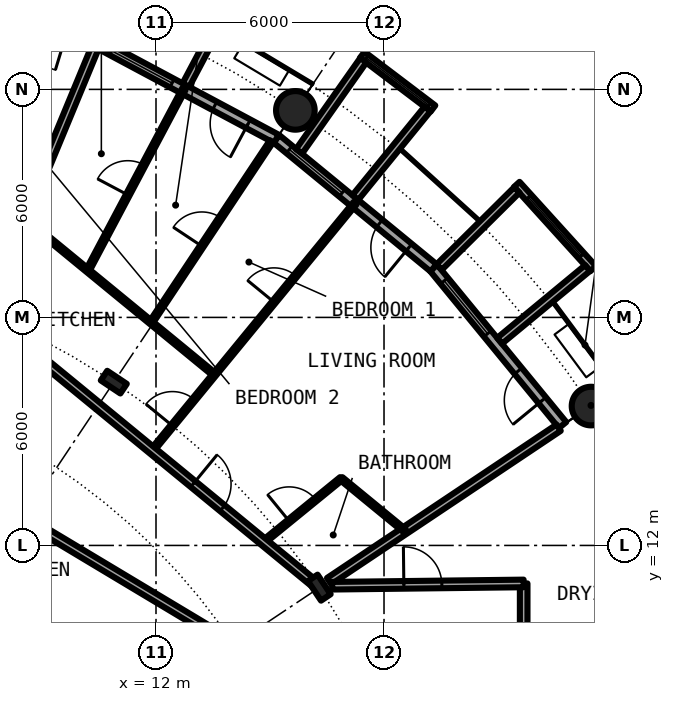
"""IFC4 building model, lengths in metres.
Left out: names, types, materials, properties, quantities, classifications, styles, units other than length and angle.
Written with IfcOpenShell. Run it as: python <this file> out.ifc"""

import sys

from ifc_helpers import new_model, si_unit, direction, frame, frame_2d, origin, origin_2d, place, context, subcontext, project, spatial, rectangle, circle, hollow_circle, i_section, extrude, element, fill, save


model = new_model("IFC4")
c1 = context("Model", 3, precision=1e-05, world=origin(), true_north=direction((0.0, 1.0)))
c2 = subcontext(c1, "Body", "Model", "MODEL_VIEW")
j1 = project(units=[si_unit("LENGTHUNIT", "METRE"), si_unit("PLANEANGLEUNIT", "RADIAN")], contexts=[c1])
p1 = place(None, origin())
s1 = spatial("IfcSite", under=j1, at=p1, CompositionType="ELEMENT")
p2 = place(p1, origin())
s2 = spatial("IfcBuilding", under=s1, at=p2, CompositionType="ELEMENT")
p3 = place(p2, frame((0.0, 0.0, 50.25)))
s3 = spatial("IfcBuildingStorey", under=s2, at=p3, CompositionType="ELEMENT", Elevation=50.25)
for number, where, z_axis, x_axis in (
    (1, (23.448, 15.667, 0.0), (0.0, 0.0, 1.0), (1.0, 0.0, 0.0)),
    (2, (15.667, 23.448, 0.0), (0.0, 0.0, 1.0), (1.0, 0.0, 0.0)),
):
    element("IfcColumn", number, at=place(p3, frame(where, z_axis=z_axis, x_axis=x_axis)), inside=s3, PredefinedType="COLUMN", context=c2, shape_type="SweptSolid", body=[
        extrude(hollow_circle(Radius=0.508, WallThickness=0.05, at=origin_2d()), origin(), (0.0, 0.0, 1.0), 3.05),
    ])
for number, where, z_axis, x_axis in (
    (3, (16.297, 10.889, 0.0), (0.0, 0.0, 1.0), (0.831, 0.556, 0.0)),
    (4, (10.889, 16.297, 0.0), (0.0, 0.0, 1.0), (0.556, 0.831, 0.0)),
):
    element("IfcColumn", number, at=place(p3, frame(where, z_axis=z_axis, x_axis=x_axis)), inside=s3, PredefinedType="COLUMN", context=c2, shape_type="SweptSolid", body=[
        extrude(i_section(OverallWidth=0.305, OverallDepth=0.62, WebThickness=0.021, FlangeThickness=0.04, FilletRadius=0.027, at=origin_2d()), origin(), (0.0, 0.0, 1.0), 3.05),
    ])
p4 = place(p3, frame((22.699, 15.167, 0.0), z_axis=(0.0, 0.0, 1.0), x_axis=(-0.634382322723, 0.773019449054, 0.0)))
e5 = element("IfcWall", 5, at=p4, inside=s3, PredefinedType="SOLIDWALL", context=c2, shape_type="SweptSolid", body=[
    extrude(rectangle(XDim=5.352, YDim=0.25, at=frame_2d((2.676, 0.0))), origin(), (0.0, 0.0, 1.0), 2.7),
])
p5 = place(p4, frame((0.841, 0.0, 0.0)))
e6 = element("IfcOpeningElement", 6, at=p5, cuts=e5, PredefinedType="OPENING", context=c2, shape_type="SweptSolid", body=[
    extrude(rectangle(XDim=1.0, YDim=2.2, at=frame_2d((0.5, 1.1))), frame((0.0, 0.135, 0.0), z_axis=(0.0, -1.0, 0.0), x_axis=(1.0, 0.0, 0.0)), (0.0, 0.0, 1.0), 0.27),
])
p6 = place(p4, frame((3.111, 0.0, 0.3)))
e7 = element("IfcOpeningElement", 7, at=p6, cuts=e5, PredefinedType="OPENING", context=c2, shape_type="SweptSolid", body=[
    extrude(rectangle(XDim=1.8, YDim=2.1, at=frame_2d((0.9, 1.05))), frame((0.0, 0.135, 0.0), z_axis=(0.0, -1.0, 0.0), x_axis=(1.0, 0.0, 0.0)), (0.0, 0.0, 1.0), 0.27),
])
p7 = place(p3, frame((23.503, 19.282, -0.03), z_axis=(0.0, 0.0, 1.0), x_axis=(-0.671506829416, 0.740998365753, 0.0)))
e8 = element("IfcWall", 8, at=p7, inside=s3, PredefinedType="SOLIDWALL", context=c2, shape_type="SweptSolid", body=[
    extrude(rectangle(XDim=2.993, YDim=0.2, at=frame_2d((1.497, 0.0))), origin(), (0.0, 0.0, 1.0), 2.73),
])
p8 = place(p7, frame((0.457, 0.0, 0.33)))
e9 = element("IfcOpeningElement", 9, at=p8, cuts=e8, PredefinedType="OPENING", context=c2, shape_type="SweptSolid", body=[
    extrude(circle(Radius=1.04, at=frame_2d((1.04, 1.04))), frame((0.0, 0.11, 0.0), z_axis=(0.0, -1.0, 0.0), x_axis=(1.0, 0.0, 0.0)), (0.0, 0.0, 1.0), 0.22),
])
p9 = place(p3, frame((21.041, 17.384, -0.03), z_axis=(0.0, 0.0, 1.0), x_axis=(0.770784861449, 0.63709551667, 0.0)))
e10 = element("IfcWall", 10, at=p9, inside=s3, PredefinedType="SOLIDWALL", context=c2, shape_type="SweptSolid", body=[
    extrude(rectangle(XDim=3.006, YDim=0.2, at=frame_2d((1.503, 0.0))), origin(), (0.0, 0.0, 1.0), 2.73),
])
p10 = place(p3, frame((19.45, 19.323, -0.03), z_axis=(0.0, 0.0, 1.0), x_axis=(0.709727076896, 0.704476739375, 0.0)))
e11 = element("IfcWall", 11, at=p10, inside=s3, PredefinedType="SOLIDWALL", context=c2, shape_type="SweptSolid", body=[
    extrude(rectangle(XDim=2.883, YDim=0.2, at=frame_2d((1.441, 0.0))), origin(), (0.0, 0.0, 1.0), 2.73),
])
p11 = place(p3, frame((19.304, 19.304, 0.0), z_axis=(0.0, 0.0, 1.0), x_axis=(-0.773019449054, 0.634382322723, 0.0)))
e12 = element("IfcWall", 12, at=p11, inside=s3, PredefinedType="SOLIDWALL", context=c2, shape_type="SweptSolid", body=[
    extrude(rectangle(XDim=5.352, YDim=0.25, at=frame_2d((2.676, 0.0))), origin(), (0.0, 0.0, 1.0), 2.7),
])
p12 = place(p11, frame((0.841, 0.0, 0.0)))
e13 = element("IfcOpeningElement", 13, at=p12, cuts=e12, PredefinedType="OPENING", context=c2, shape_type="SweptSolid", body=[
    extrude(rectangle(XDim=1.0, YDim=2.2, at=frame_2d((0.5, 1.1))), frame((0.0, 0.135, 0.0), z_axis=(0.0, -1.0, 0.0), x_axis=(1.0, 0.0, 0.0)), (0.0, 0.0, 1.0), 0.27),
])
p13 = place(p11, frame((3.111, 0.0, 0.3)))
e14 = element("IfcOpeningElement", 14, at=p13, cuts=e12, PredefinedType="OPENING", context=c2, shape_type="SweptSolid", body=[
    extrude(rectangle(XDim=1.8, YDim=2.1, at=frame_2d((0.9, 1.05))), frame((0.0, 0.135, 0.0), z_axis=(0.0, -1.0, 0.0), x_axis=(1.0, 0.0, 0.0)), (0.0, 0.0, 1.0), 0.27),
])
p14 = place(p3, frame((19.289, 23.497, -0.03), z_axis=(0.0, 0.0, 1.0), x_axis=(-0.796842165306, 0.60418752353, 0.0)))
e15 = element("IfcWall", 15, at=p14, inside=s3, PredefinedType="SOLIDWALL", context=c2, shape_type="SweptSolid", body=[
    extrude(rectangle(XDim=2.337, YDim=0.2, at=frame_2d((1.168, 0.0))), origin(), (0.0, 0.0, 1.0), 2.73),
])
p15 = place(p14, frame((0.128, 0.0, 0.33)))
e16 = element("IfcOpeningElement", 16, at=p15, cuts=e15, PredefinedType="OPENING", context=c2, shape_type="SweptSolid", body=[
    extrude(circle(Radius=1.04, at=frame_2d((1.04, 1.04))), frame((0.0, 0.11, 0.0), z_axis=(0.0, -1.0, 0.0), x_axis=(1.0, 0.0, 0.0)), (0.0, 0.0, 1.0), 0.22),
])
p16 = place(p3, frame((17.246, 21.155, -0.03), z_axis=(0.0, 0.0, 1.0), x_axis=(0.631741648902, 0.775179004516, 0.0)))
e17 = element("IfcWall", 17, at=p16, inside=s3, PredefinedType="SOLIDWALL", context=c2, shape_type="SweptSolid", body=[
    extrude(rectangle(XDim=3.006, YDim=0.2, at=frame_2d((1.503, 0.0))), origin(), (0.0, 0.0, 1.0), 2.73),
])
p17 = place(p3, frame((15.765, 22.37, -0.03), z_axis=(0.0, 0.0, 1.0), x_axis=(0.576274612209, 0.817256123454, 0.0)))
e18 = element("IfcWall", 18, at=p17, inside=s3, PredefinedType="SOLIDWALL", context=c2, shape_type="SweptSolid", body=[
    extrude(rectangle(XDim=2.933, YDim=0.2, at=frame_2d((1.466, 0.0))), origin(), (0.0, 0.0, 1.0), 2.73),
])
p18 = place(p3, frame((15.167, 22.699, 0.0), z_axis=(0.0, 0.0, 1.0), x_axis=(-0.881915646801, 0.471407246368, 0.0)))
e19 = element("IfcWall", 19, at=p18, inside=s3, PredefinedType="SOLIDWALL", context=c2, shape_type="SweptSolid", body=[
    extrude(rectangle(XDim=5.352, YDim=0.25, at=frame_2d((2.676, 0.0))), origin(), (0.0, 0.0, 1.0), 2.7),
])
p19 = place(p18, frame((0.841, 0.0, 0.0)))
e20 = element("IfcOpeningElement", 20, at=p19, cuts=e19, PredefinedType="OPENING", context=c2, shape_type="SweptSolid", body=[
    extrude(rectangle(XDim=1.0, YDim=2.2, at=frame_2d((0.5, 1.1))), frame((0.0, 0.135, 0.0), z_axis=(0.0, -1.0, 0.0), x_axis=(1.0, 0.0, 0.0)), (0.0, 0.0, 1.0), 0.27),
])
p20 = place(p18, frame((3.111, 0.0, 0.3)))
e21 = element("IfcOpeningElement", 21, at=p20, cuts=e19, PredefinedType="OPENING", context=c2, shape_type="SweptSolid", body=[
    extrude(rectangle(XDim=1.8, YDim=2.1, at=frame_2d((0.9, 1.05))), frame((0.0, 0.135, 0.0), z_axis=(0.0, -1.0, 0.0), x_axis=(1.0, 0.0, 0.0)), (0.0, 0.0, 1.0), 0.27),
])
p21 = place(p3, frame((12.787, 24.113, -0.03), z_axis=(0.0, 0.0, 1.0), x_axis=(0.468365282436, 0.883534924159, 0.0)))
e22 = element("IfcWall", 22, at=p21, inside=s3, PredefinedType="SOLIDWALL", context=c2, shape_type="SweptSolid", body=[
    extrude(rectangle(XDim=3.006, YDim=0.2, at=frame_2d((1.503, 0.0))), origin(), (0.0, 0.0, 1.0), 2.73),
])
p22 = place(p3, frame((21.675, 9.4, 0.0), z_axis=(0.0, 0.0, 1.0), x_axis=(0.0, 1.0, 0.0)))
e23 = element("IfcWall", 23, at=p22, inside=s3, PredefinedType="PARTITIONING", context=c2, shape_type="SweptSolid", body=[
    extrude(rectangle(XDim=1.6, YDim=0.2, at=frame_2d((0.8, 0.0))), origin(), (0.0, 0.0, 1.0), 2.7),
])
p23 = place(p3, frame((7.501, 18.108, 0.0), z_axis=(0.0, 0.0, 1.0), x_axis=(0.382600411313, 0.923913916587, 0.0)))
e24 = element("IfcWall", 24, at=p23, inside=s3, PredefinedType="PARTITIONING", context=c2, shape_type="SweptSolid", body=[
    extrude(rectangle(XDim=7.574, YDim=0.2, at=frame_2d((3.787, 0.0))), origin(), (0.0, 0.0, 1.0), 2.7),
])
p24 = place(p3, frame((10.202, 19.234, 0.0), z_axis=(0.0, 0.0, 1.0), x_axis=(0.468610030042, 0.883405139075, 0.0)))
e25 = element("IfcWall", 25, at=p24, inside=s3, PredefinedType="PARTITIONING", context=c2, shape_type="SweptSolid", body=[
    extrude(rectangle(XDim=5.403, YDim=0.1, at=frame_2d((2.702, 0.0))), origin(), (0.0, 0.0, 1.0), 2.7),
])
p25 = place(p24, frame((2.252, 0.0, 0.0)))
e26 = element("IfcOpeningElement", 26, at=p25, cuts=e25, PredefinedType="OPENING", context=c2, shape_type="SweptSolid", body=[
    extrude(rectangle(XDim=0.9, YDim=2.3, at=frame_2d((0.45, 1.15))), frame((0.0, 0.06, 0.0), z_axis=(0.0, -1.0, 0.0), x_axis=(1.0, 0.0, 0.0)), (0.0, 0.0, 1.0), 0.12),
])
p26 = place(p3, frame((11.87, 17.865, 0.0), z_axis=(0.0, 0.0, 1.0), x_axis=(0.553440102418, 0.832888980018, 0.0)))
e27 = element("IfcWall", 27, at=p26, inside=s3, PredefinedType="PARTITIONING", context=c2, shape_type="SweptSolid", body=[
    extrude(rectangle(XDim=5.726, YDim=0.1, at=frame_2d((2.863, 0.0))), origin(), (0.0, 0.0, 1.0), 2.7),
])
p27 = place(p26, frame((2.413, 0.0, 0.0)))
e28 = element("IfcOpeningElement", 28, at=p27, cuts=e27, PredefinedType="OPENING", context=c2, shape_type="SweptSolid", body=[
    extrude(rectangle(XDim=0.9, YDim=2.3, at=frame_2d((0.45, 1.15))), frame((0.0, 0.06, 0.0), z_axis=(0.0, -1.0, 0.0), x_axis=(1.0, 0.0, 0.0)), (0.0, 0.0, 1.0), 0.12),
])
p28 = place(p3, frame((11.899, 14.499, 0.0), z_axis=(0.0, 0.0, 1.0), x_axis=(0.634396151441, 0.77300810024, 0.0)))
e29 = element("IfcWall", 29, at=p28, inside=s3, PredefinedType="PARTITIONING", context=c2, shape_type="SweptSolid", body=[
    extrude(rectangle(XDim=8.419, YDim=0.1, at=frame_2d((4.209, 0.0))), origin(), (0.0, 0.0, 1.0), 2.7),
])
p29 = place(p28, frame((0.84, 0.0, 0.0)))
e30 = element("IfcOpeningElement", 30, at=p29, cuts=e29, PredefinedType="OPENING", context=c2, shape_type="SweptSolid", body=[
    extrude(rectangle(XDim=0.9, YDim=2.3, at=frame_2d((0.45, 1.15))), frame((0.0, 0.06, 0.0), z_axis=(0.0, -1.0, 0.0), x_axis=(1.0, 0.0, 0.0)), (0.0, 0.0, 1.0), 0.12),
])
p30 = place(p28, frame((5.051, 0.0, 0.0)))
e31 = element("IfcOpeningElement", 31, at=p30, cuts=e29, PredefinedType="OPENING", context=c2, shape_type="SweptSolid", body=[
    extrude(rectangle(XDim=0.9, YDim=2.3, at=frame_2d((0.45, 1.15))), frame((0.0, 0.06, 0.0), z_axis=(0.0, -1.0, 0.0), x_axis=(1.0, 0.0, 0.0)), (0.0, 0.0, 1.0), 0.12),
])
p31 = place(p3, frame((14.831, 12.092, 0.0), z_axis=(0.0, 0.0, 1.0), x_axis=(0.774979608522, 0.631986239072, 0.0)))
e32 = element("IfcWall", 32, at=p31, inside=s3, PredefinedType="PARTITIONING", context=c2, shape_type="SweptSolid", body=[
    extrude(rectangle(XDim=2.636, YDim=0.1, at=frame_2d((1.318, 0.0))), origin(), (0.0, 0.0, 1.0), 2.7),
])
p32 = place(p31, frame((0.868, 0.0, 0.0)))
e33 = element("IfcOpeningElement", 33, at=p32, cuts=e32, PredefinedType="OPENING", context=c2, shape_type="SweptSolid", body=[
    extrude(rectangle(XDim=0.9, YDim=2.3, at=frame_2d((0.45, 1.15))), frame((0.0, 0.06, 0.0), z_axis=(0.0, -1.0, 0.0), x_axis=(1.0, 0.0, 0.0)), (0.0, 0.0, 1.0), 0.12),
])
p33 = place(p3, frame((16.555, 11.061, 0.0), z_axis=(0.0, 0.0, 1.0), x_axis=(0.831403467378, 0.55566921314, 0.0)))
e34 = element("IfcWall", 34, at=p33, inside=s3, PredefinedType="PARTITIONING", context=c2, shape_type="SweptSolid", body=[
    extrude(rectangle(XDim=7.265, YDim=0.2, at=frame_2d((3.632, 0.0))), origin(), (0.0, 0.0, 1.0), 2.7),
])
p34 = place(p3, frame((16.636, 10.94, 0.0), z_axis=(0.0, 0.0, 1.0), x_axis=(0.999928980998, 0.011917758204, 0.0)))
e35 = element("IfcWall", 35, at=p34, inside=s3, PredefinedType="PARTITIONING", context=c2, shape_type="SweptSolid", body=[
    extrude(rectangle(XDim=5.039, YDim=0.2, at=frame_2d((2.52, 0.0))), origin(), (0.0, 0.0, 1.0), 2.7),
])
p35 = place(p34, frame((1.886, 0.0, 0.0)))
e36 = element("IfcOpeningElement", 36, at=p35, cuts=e35, PredefinedType="OPENING", context=c2, shape_type="SweptSolid", body=[
    extrude(rectangle(XDim=1.0, YDim=2.3, at=frame_2d((0.5, 1.15))), frame((0.0, 0.11, 0.0), z_axis=(0.0, -1.0, 0.0), x_axis=(1.0, 0.0, 0.0)), (0.0, 0.0, 1.0), 0.22),
])
p36 = place(p3, frame((4.863, 12.05, 0.0), z_axis=(0.0, 0.0, 1.0), x_axis=(0.857576410704, -0.51435658818, 0.0)))
e37 = element("IfcWall", 37, at=p36, inside=s3, PredefinedType="PARTITIONING", context=c2, shape_type="SweptSolid", body=[
    extrude(rectangle(XDim=5.16, YDim=0.1, at=frame_2d((2.58, 0.0))), origin(), (0.0, 0.0, 1.0), 2.7),
])
p37 = place(p3, frame((1.658, 16.819, 0.0), z_axis=(0.0, 0.0, 1.0), x_axis=(0.857688434449, -0.514169767113, 0.0)))
e38 = element("IfcWall", 38, at=p37, inside=s3, PredefinedType="PARTITIONING", context=c2, shape_type="SweptSolid", body=[
    extrude(rectangle(XDim=14.429, YDim=0.2, at=frame_2d((7.215, 0.0))), origin(), (0.0, 0.0, 1.0), 2.7),
])
p38 = place(p37, frame((4.316, 0.0, 0.0)))
e39 = element("IfcOpeningElement", 39, at=p38, cuts=e38, PredefinedType="OPENING", context=c2, shape_type="SweptSolid", body=[
    extrude(rectangle(XDim=1.0, YDim=2.3, at=frame_2d((0.5, 1.15))), frame((0.0, 0.11, 0.0), z_axis=(0.0, -1.0, 0.0), x_axis=(1.0, 0.0, 0.0)), (0.0, 0.0, 1.0), 0.22),
])
p39 = place(p3, frame((7.5, 18.108, 0.0), z_axis=(0.0, 0.0, 1.0), x_axis=(0.773041360816, -0.634355621452, 0.0)))
e40 = element("IfcWall", 40, at=p39, inside=s3, PredefinedType="PARTITIONING", context=c2, shape_type="SweptSolid", body=[
    extrude(rectangle(XDim=11.221, YDim=0.2, at=frame_2d((5.61, 0.0))), origin(), (0.0, 0.0, 1.0), 2.38),
])
p40 = place(p39, frame((7.083, 0.0, 0.0)))
e41 = element("IfcOpeningElement", 41, at=p40, cuts=e40, PredefinedType="OPENING", context=c2, shape_type="SweptSolid", body=[
    extrude(rectangle(XDim=1.0, YDim=2.3, at=frame_2d((0.5, 1.15))), frame((0.0, 0.11, 0.0), z_axis=(0.0, -1.0, 0.0), x_axis=(1.0, 0.0, 0.0)), (0.0, 0.0, 1.0), 0.22),
])
p41 = place(p3, frame((8.534, 20.603, 0.0), z_axis=(0.0, 0.0, 1.0), x_axis=(0.773000340237, -0.634405606843, 0.0)))
e42 = element("IfcWall", 42, at=p41, inside=s3, PredefinedType="PARTITIONING", context=c2, shape_type="SweptSolid", body=[
    extrude(rectangle(XDim=6.474, YDim=0.1, at=frame_2d((3.237, 0.0))), origin(), (0.0, 0.0, 1.0), 2.7),
])
p42 = place(p3, frame((16.874, 13.758, 0.0), z_axis=(0.0, 0.0, 1.0), x_axis=(0.772948171844, -0.634469166818, 0.0)))
e43 = element("IfcWall", 43, at=p42, inside=s3, PredefinedType="PARTITIONING", context=c2, shape_type="SweptSolid", body=[
    extrude(rectangle(XDim=2.158, YDim=0.1, at=frame_2d((1.079, 0.0))), origin(), (0.0, 0.0, 1.0), 2.7),
])
p43 = place(p5, origin())
e44 = element("IfcDoor", 44, at=p43, inside=s3, OperationType="SINGLE_SWING_LEFT", PredefinedType="DOOR", context=c2, shape_type="SweptSolid", body=[
    extrude(rectangle(XDim=1.0, YDim=2.2, at=frame_2d((0.5, 1.1))), frame((0.0, 0.025, 0.0), z_axis=(0.0, -1.0, 0.0), x_axis=(1.0, 0.0, 0.0)), (0.0, 0.0, 1.0), 0.05),
])
fill(e6, e44)
p44 = place(p6, origin())
e45 = element("IfcWindow", 45, at=p44, inside=s3, PartitioningType="SINGLE_PANEL", PredefinedType="WINDOW", context=c2, shape_type="SweptSolid", body=[
    extrude(rectangle(XDim=1.8, YDim=2.1, at=frame_2d((0.9, 1.05))), frame((0.0, 0.03, 0.0), z_axis=(0.0, -1.0, 0.0), x_axis=(1.0, 0.0, 0.0)), (0.0, 0.0, 1.0), 0.06),
])
fill(e7, e45)
p45 = place(p8, origin())
e46 = element("IfcWindow", 46, at=p45, inside=s3, PartitioningType="SINGLE_PANEL", PredefinedType="WINDOW", context=c2, shape_type="SweptSolid", body=[
    extrude(circle(Radius=1.04, at=frame_2d((1.04, 1.04))), frame((0.0, 0.03, 0.0), z_axis=(0.0, -1.0, 0.0), x_axis=(1.0, 0.0, 0.0)), (0.0, 0.0, 1.0), 0.06),
])
fill(e9, e46)
p46 = place(p12, origin())
e47 = element("IfcDoor", 47, at=p46, inside=s3, OperationType="SINGLE_SWING_LEFT", PredefinedType="DOOR", context=c2, shape_type="SweptSolid", body=[
    extrude(rectangle(XDim=1.0, YDim=2.2, at=frame_2d((0.5, 1.1))), frame((0.0, 0.025, 0.0), z_axis=(0.0, -1.0, 0.0), x_axis=(1.0, 0.0, 0.0)), (0.0, 0.0, 1.0), 0.05),
])
fill(e13, e47)
p47 = place(p13, origin())
e48 = element("IfcWindow", 48, at=p47, inside=s3, PartitioningType="SINGLE_PANEL", PredefinedType="WINDOW", context=c2, shape_type="SweptSolid", body=[
    extrude(rectangle(XDim=1.8, YDim=2.1, at=frame_2d((0.9, 1.05))), frame((0.0, 0.03, 0.0), z_axis=(0.0, -1.0, 0.0), x_axis=(1.0, 0.0, 0.0)), (0.0, 0.0, 1.0), 0.06),
])
fill(e14, e48)
p48 = place(p15, origin())
e49 = element("IfcWindow", 49, at=p48, inside=s3, PartitioningType="SINGLE_PANEL", PredefinedType="WINDOW", context=c2, shape_type="SweptSolid", body=[
    extrude(circle(Radius=1.04, at=frame_2d((1.04, 1.04))), frame((0.0, 0.03, 0.0), z_axis=(0.0, -1.0, 0.0), x_axis=(1.0, 0.0, 0.0)), (0.0, 0.0, 1.0), 0.06),
])
fill(e16, e49)
p49 = place(p19, origin())
e50 = element("IfcDoor", 50, at=p49, inside=s3, OperationType="SINGLE_SWING_LEFT", PredefinedType="DOOR", context=c2, shape_type="SweptSolid", body=[
    extrude(rectangle(XDim=1.0, YDim=2.2, at=frame_2d((0.5, 1.1))), frame((0.0, 0.025, 0.0), z_axis=(0.0, -1.0, 0.0), x_axis=(1.0, 0.0, 0.0)), (0.0, 0.0, 1.0), 0.05),
])
fill(e20, e50)
p50 = place(p20, origin())
e51 = element("IfcWindow", 51, at=p50, inside=s3, PartitioningType="SINGLE_PANEL", PredefinedType="WINDOW", context=c2, shape_type="SweptSolid", body=[
    extrude(rectangle(XDim=1.8, YDim=2.1, at=frame_2d((0.9, 1.05))), frame((0.0, 0.03, 0.0), z_axis=(0.0, -1.0, 0.0), x_axis=(1.0, 0.0, 0.0)), (0.0, 0.0, 1.0), 0.06),
])
fill(e21, e51)
p51 = place(p40, origin())
e52 = element("IfcDoor", 52, at=p51, inside=s3, OperationType="SINGLE_SWING_RIGHT", PredefinedType="DOOR", context=c2, shape_type="SweptSolid", body=[
    extrude(rectangle(XDim=1.0, YDim=2.3, at=frame_2d((0.5, 1.15))), frame((0.0, 0.025, 0.0), z_axis=(0.0, -1.0, 0.0), x_axis=(1.0, 0.0, 0.0)), (0.0, 0.0, 1.0), 0.05),
])
fill(e41, e52)
p52 = place(p32, origin())
e53 = element("IfcDoor", 53, at=p52, inside=s3, OperationType="SINGLE_SWING_RIGHT", PredefinedType="DOOR", context=c2, shape_type="SweptSolid", body=[
    extrude(rectangle(XDim=0.9, YDim=2.3, at=frame_2d((0.45, 1.15))), frame((0.0, 0.025, 0.0), z_axis=(0.0, -1.0, 0.0), x_axis=(1.0, 0.0, 0.0)), (0.0, 0.0, 1.0), 0.05),
])
fill(e33, e53)
p53 = place(p29, origin())
e54 = element("IfcDoor", 54, at=p53, inside=s3, OperationType="SINGLE_SWING_LEFT", PredefinedType="DOOR", context=c2, shape_type="SweptSolid", body=[
    extrude(rectangle(XDim=0.9, YDim=2.3, at=frame_2d((0.45, 1.15))), frame((0.0, 0.025, 0.0), z_axis=(0.0, -1.0, 0.0), x_axis=(1.0, 0.0, 0.0)), (0.0, 0.0, 1.0), 0.05),
])
fill(e30, e54)
p54 = place(p30, origin())
e55 = element("IfcDoor", 55, at=p54, inside=s3, OperationType="SINGLE_SWING_RIGHT", PredefinedType="DOOR", context=c2, shape_type="SweptSolid", body=[
    extrude(rectangle(XDim=0.9, YDim=2.3, at=frame_2d((0.45, 1.15))), frame((0.0, 0.025, 0.0), z_axis=(0.0, -1.0, 0.0), x_axis=(1.0, 0.0, 0.0)), (0.0, 0.0, 1.0), 0.05),
])
fill(e31, e55)
p55 = place(p27, origin())
e56 = element("IfcDoor", 56, at=p55, inside=s3, OperationType="SINGLE_SWING_LEFT", PredefinedType="DOOR", context=c2, shape_type="SweptSolid", body=[
    extrude(rectangle(XDim=0.9, YDim=2.3, at=frame_2d((0.45, 1.15))), frame((0.0, 0.025, 0.0), z_axis=(0.0, -1.0, 0.0), x_axis=(1.0, 0.0, 0.0)), (0.0, 0.0, 1.0), 0.05),
])
fill(e28, e56)
p56 = place(p25, origin())
e57 = element("IfcDoor", 57, at=p56, inside=s3, OperationType="SINGLE_SWING_LEFT", PredefinedType="DOOR", context=c2, shape_type="SweptSolid", body=[
    extrude(rectangle(XDim=0.9, YDim=2.3, at=frame_2d((0.45, 1.15))), frame((0.0, 0.025, 0.0), z_axis=(0.0, -1.0, 0.0), x_axis=(1.0, 0.0, 0.0)), (0.0, 0.0, 1.0), 0.05),
])
fill(e26, e57)
p57 = place(p35, origin())
e58 = element("IfcDoor", 58, at=p57, inside=s3, OperationType="SINGLE_SWING_LEFT", PredefinedType="DOOR", context=c2, shape_type="SweptSolid", body=[
    extrude(rectangle(XDim=1.0, YDim=2.3, at=frame_2d((0.5, 1.15))), frame((0.0, 0.025, 0.0), z_axis=(0.0, -1.0, 0.0), x_axis=(1.0, 0.0, 0.0)), (0.0, 0.0, 1.0), 0.05),
])
fill(e36, e58)
save(model, sys.argv[1])
